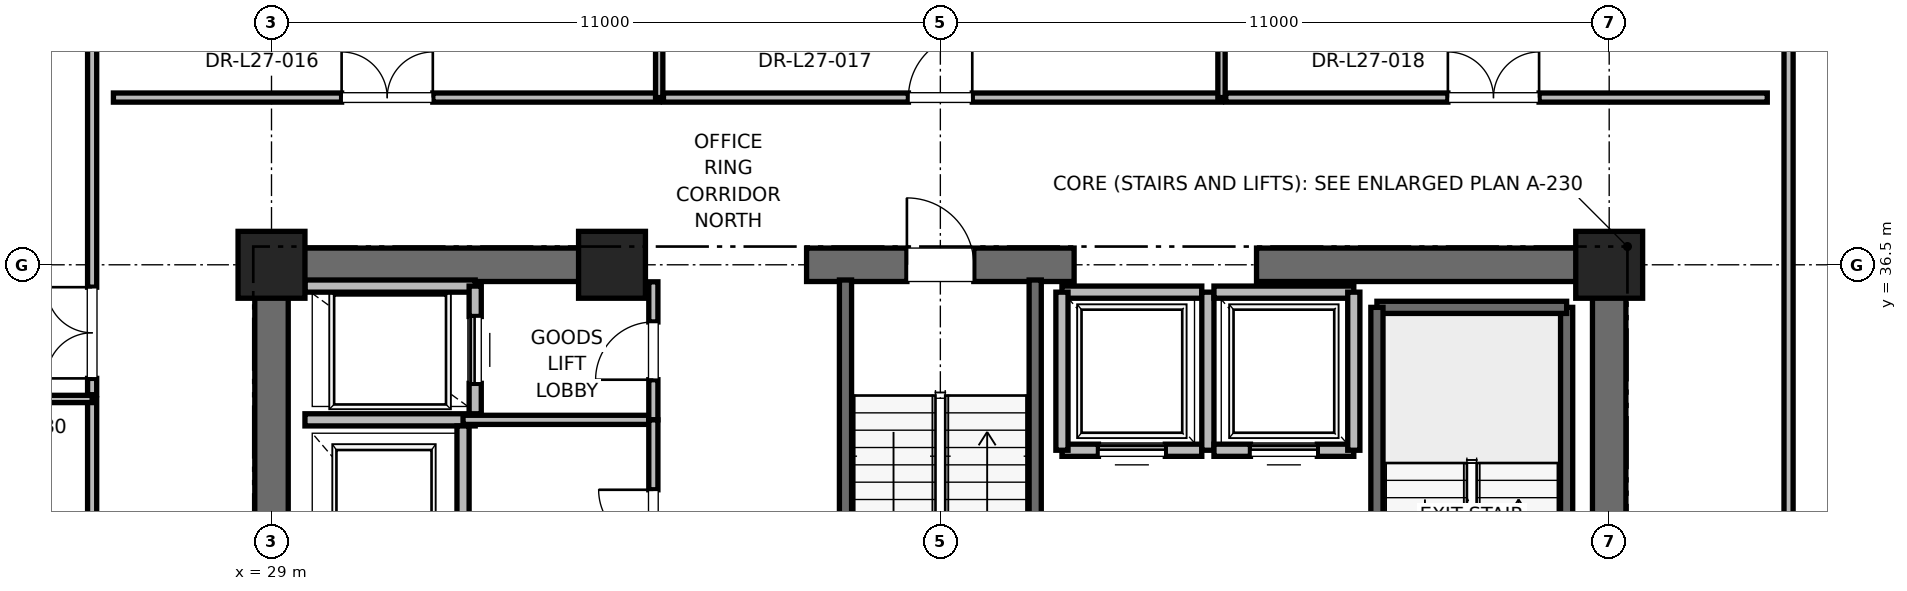
"""IFC4 building model, lengths in metres.
Left out: names, types, materials, properties, quantities, classifications, styles, units other than length and angle.
Written with IfcOpenShell. Run it as: python <this file> out.ifc"""

import sys

from ifc_helpers import new_model, si_unit, direction, frame, frame_2d, origin, origin_2d, place, context, subcontext, project, spatial, rectangle, extrude, element, fill, save


model = new_model("IFC4")
c1 = context("Model", 3, precision=1e-05, world=origin(), true_north=direction((0.0, 1.0)))
c2 = subcontext(c1, "Body", "Model", "MODEL_VIEW")
j1 = project(units=[si_unit("LENGTHUNIT", "METRE"), si_unit("PLANEANGLEUNIT", "RADIAN")], contexts=[c1])
p1 = place(None, origin())
s1 = spatial("IfcSite", under=j1, at=p1, CompositionType="ELEMENT")
p2 = place(p1, origin())
s2 = spatial("IfcBuilding", under=s1, at=p2, CompositionType="ELEMENT")
p3 = place(p2, frame((0.0, 0.0, 118.4)))
s3 = spatial("IfcBuildingStorey", under=s2, at=p3, CompositionType="ELEMENT", Elevation=118.4)
for number, where, z_axis, x_axis in (
    (1, (29.0, 36.5, 0.0), (0.0, 0.0, 1.0), (1.0, 0.0, 0.0)),
    (2, (51.0, 36.5, 0.0), (0.0, 0.0, 1.0), (1.0, 0.0, 0.0)),
    (3, (34.6, 36.5, 0.0), (0.0, 0.0, 1.0), (1.0, 0.0, 0.0)),
):
    element("IfcColumn", number, at=place(p3, frame(where, z_axis=z_axis, x_axis=x_axis)), inside=s3, PredefinedType="PILASTER", context=c2, shape_type="SweptSolid", body=[
        extrude(rectangle(XDim=1.1, YDim=1.1, at=origin_2d()), origin(), (0.0, 0.0, 1.0), 5.0),
    ])
p4 = place(p3, frame((29.0, 36.5, 0.0), z_axis=(0.0, 0.0, 1.0), x_axis=(1.0, 0.0, 0.0)))
e4 = element("IfcWall", 4, at=p4, inside=s3, PredefinedType="SHEAR", context=c2, shape_type="SweptSolid", body=[
    extrude(rectangle(XDim=5.8, YDim=0.55, at=frame_2d((2.9, 0.0))), origin(), (0.0, 0.0, 1.0), 4.7),
])
p5 = place(p3, frame((37.8, 36.5, 0.0), z_axis=(0.0, 0.0, 1.0), x_axis=(1.0, 0.0, 0.0)))
e5 = element("IfcWall", 5, at=p5, inside=s3, PredefinedType="SHEAR", context=c2, shape_type="SweptSolid", body=[
    extrude(rectangle(XDim=4.4, YDim=0.55, at=frame_2d((2.2, 0.0))), origin(), (0.0, 0.0, 1.0), 4.7),
])
p6 = place(p5, frame((1.65, 0.0, 0.0)))
e6 = element("IfcOpeningElement", 6, at=p6, cuts=e5, PredefinedType="OPENING", context=c2, shape_type="SweptSolid", body=[
    extrude(rectangle(XDim=1.1, YDim=2.15, at=frame_2d((0.55, 1.075))), frame((0.0, 0.275, 0.0), z_axis=(0.0, -1.0, 0.0), x_axis=(1.0, 0.0, 0.0)), (0.0, 0.0, 1.0), 0.55),
])
for number, where, z_axis, x_axis in (
    (7, (45.2, 36.5, 0.0), (0.0, 0.0, 1.0), (1.0, 0.0, 0.0)),
    (8, (29.0, 30.7, 0.0), (0.0, 0.0, 1.0), (0.0, 1.0, 0.0)),
):
    element("IfcWall", number, at=place(p3, frame(where, z_axis=z_axis, x_axis=x_axis)), inside=s3, PredefinedType="SHEAR", context=c2, shape_type="SweptSolid", body=[
        extrude(rectangle(XDim=5.8, YDim=0.55, at=frame_2d((2.9, 0.0))), origin(), (0.0, 0.0, 1.0), 4.7),
    ])
p7 = place(p3, frame((51.0, 27.7, 0.0), z_axis=(0.0, 0.0, 1.0), x_axis=(0.0, 1.0, 0.0)))
e9 = element("IfcWall", 9, at=p7, inside=s3, PredefinedType="SHEAR", context=c2, shape_type="SweptSolid", body=[
    extrude(rectangle(XDim=8.8, YDim=0.55, at=frame_2d((4.4, 0.0))), origin(), (0.0, 0.0, 1.0), 4.7),
])
p8 = place(p3, frame((50.3, 27.65, 0.0), z_axis=(0.0, 0.0, 1.0), x_axis=(0.0, 1.0, 0.0)))
e10 = element("IfcWall", 10, at=p8, inside=s3, PredefinedType="SOLIDWALL", context=c2, shape_type="SweptSolid", body=[
    extrude(rectangle(XDim=8.15, YDim=0.2, at=frame_2d((4.075, 0.0))), origin(), (0.0, 0.0, 1.0), 4.7),
])
p9 = place(p3, frame((47.18, 35.8, 0.0), z_axis=(0.0, 0.0, 1.0), x_axis=(1.0, 0.0, 0.0)))
e11 = element("IfcWall", 11, at=p9, inside=s3, PredefinedType="SOLIDWALL", context=c2, shape_type="SweptSolid", body=[
    extrude(rectangle(XDim=3.12, YDim=0.2, at=frame_2d((1.56, 0.0))), origin(), (0.0, 0.0, 1.0), 4.7),
])
p10 = place(p3, frame((47.18, 27.62, 0.0), z_axis=(0.0, 0.0, 1.0), x_axis=(0.0, 1.0, 0.0)))
e12 = element("IfcWall", 12, at=p10, inside=s3, PredefinedType="SOLIDWALL", context=c2, shape_type="SweptSolid", body=[
    extrude(rectangle(XDim=8.18, YDim=0.2, at=frame_2d((4.09, 0.0))), origin(), (0.0, 0.0, 1.0), 4.7),
])
p11 = place(p3, frame((38.44, 27.38, 0.0), z_axis=(0.0, 0.0, 1.0), x_axis=(0.0, 1.0, 0.0)))
e13 = element("IfcWall", 13, at=p11, inside=s3, PredefinedType="SOLIDWALL", context=c2, shape_type="SweptSolid", body=[
    extrude(rectangle(XDim=8.87, YDim=0.2, at=frame_2d((4.435, 0.0))), origin(), (0.0, 0.0, 1.0), 4.7),
])
p12 = place(p3, frame((41.56, 27.68, 0.0), z_axis=(0.0, 0.0, 1.0), x_axis=(0.0, 1.0, 0.0)))
e14 = element("IfcWall", 14, at=p12, inside=s3, PredefinedType="SOLIDWALL", context=c2, shape_type="SweptSolid", body=[
    extrude(rectangle(XDim=8.57, YDim=0.2, at=frame_2d((4.285, 0.0))), origin(), (0.0, 0.0, 1.0), 4.7),
])
p13 = place(p3, frame((29.55, 33.95, 0.0), z_axis=(0.0, 0.0, 1.0), x_axis=(1.0, 0.0, 0.0)))
e15 = element("IfcWall", 15, at=p13, inside=s3, PredefinedType="SOLIDWALL", context=c2, shape_type="SweptSolid", body=[
    extrude(rectangle(XDim=2.8, YDim=0.2, at=frame_2d((1.4, 0.0))), origin(), (0.0, 0.0, 1.0), 4.7),
])
p14 = place(p3, frame((32.15, 30.85, 0.0), z_axis=(0.0, 0.0, 1.0), x_axis=(0.0, 1.0, 0.0)))
e16 = element("IfcWall", 16, at=p14, inside=s3, PredefinedType="SOLIDWALL", context=c2, shape_type="SweptSolid", body=[
    extrude(rectangle(XDim=3.0, YDim=0.2, at=frame_2d((1.5, 0.0))), origin(), (0.0, 0.0, 1.0), 4.7),
])
p15 = place(p3, frame((32.35, 36.15, 0.0), z_axis=(0.0, 0.0, 1.0), x_axis=(-1.0, 0.0, 0.0)))
e17 = element("IfcWall", 17, at=p15, inside=s3, PredefinedType="SOLIDWALL", context=c2, shape_type="SweptSolid", body=[
    extrude(rectangle(XDim=2.8, YDim=0.2, at=frame_2d((1.4, 0.0))), origin(), (0.0, 0.0, 1.0), 3.91),
])
p16 = place(p3, frame((32.35, 34.05, 0.0), z_axis=(0.0, 0.0, 1.0), x_axis=(0.0, 1.0, 0.0)))
e18 = element("IfcWall", 18, at=p16, inside=s3, PredefinedType="SOLIDWALL", context=c2, shape_type="SweptSolid", body=[
    extrude(rectangle(XDim=2.1, YDim=0.2, at=frame_2d((1.05, 0.0))), origin(), (0.0, 0.0, 1.0), 4.7),
])
p17 = place(p16, frame((0.5, 0.0, 0.0)))
e19 = element("IfcOpeningElement", 19, at=p17, cuts=e18, PredefinedType="OPENING", context=c2, shape_type="SweptSolid", body=[
    extrude(rectangle(XDim=1.1, YDim=2.2, at=frame_2d((0.55, 1.1))), frame((0.0, 0.1, 0.0), z_axis=(0.0, -1.0, 0.0), x_axis=(1.0, 0.0, 0.0)), (0.0, 0.0, 1.0), 0.2),
])
p18 = place(p3, frame((42.0, 33.45, 0.0), z_axis=(0.0, 0.0, 1.0), x_axis=(1.0, 0.0, 0.0)))
e20 = element("IfcWall", 20, at=p18, inside=s3, PredefinedType="SOLIDWALL", context=c2, shape_type="SweptSolid", body=[
    extrude(rectangle(XDim=2.3, YDim=0.2, at=frame_2d((1.15, 0.0))), origin(), (0.0, 0.0, 1.0), 4.7),
])
p19 = place(p18, frame((0.6, 0.0, 0.0)))
e21 = element("IfcOpeningElement", 21, at=p19, cuts=e20, PredefinedType="OPENING", context=c2, shape_type="SweptSolid", body=[
    extrude(rectangle(XDim=1.1, YDim=2.2, at=frame_2d((0.55, 1.1))), frame((0.0, 0.1, 0.0), z_axis=(0.0, -1.0, 0.0), x_axis=(1.0, 0.0, 0.0)), (0.0, 0.0, 1.0), 0.2),
])
p20 = place(p3, frame((44.3, 36.05, 0.0), z_axis=(0.0, 0.0, 1.0), x_axis=(-1.0, 0.0, 0.0)))
e22 = element("IfcWall", 22, at=p20, inside=s3, PredefinedType="SOLIDWALL", context=c2, shape_type="SweptSolid", body=[
    extrude(rectangle(XDim=2.3, YDim=0.2, at=frame_2d((1.15, 0.0))), origin(), (0.0, 0.0, 1.0), 3.68),
])
for number, where, z_axis, x_axis in (
    (23, (42.0, 36.05, 0.0), (0.0, 0.0, 1.0), (0.0, -1.0, 0.0)),
    (24, (44.4, 33.45, 0.0), (0.0, 0.0, 1.0), (0.0, 1.0, 0.0)),
):
    element("IfcWall", number, at=place(p3, frame(where, z_axis=z_axis, x_axis=x_axis)), inside=s3, PredefinedType="SOLIDWALL", context=c2, shape_type="SweptSolid", body=[
        extrude(rectangle(XDim=2.6, YDim=0.2, at=frame_2d((1.3, 0.0))), origin(), (0.0, 0.0, 1.0), 3.68),
    ])
p21 = place(p3, frame((44.5, 33.45, 0.0), z_axis=(0.0, 0.0, 1.0), x_axis=(1.0, 0.0, 0.0)))
e25 = element("IfcWall", 25, at=p21, inside=s3, PredefinedType="SOLIDWALL", context=c2, shape_type="SweptSolid", body=[
    extrude(rectangle(XDim=2.3, YDim=0.2, at=frame_2d((1.15, 0.0))), origin(), (0.0, 0.0, 1.0), 4.7),
])
p22 = place(p21, frame((0.6, 0.0, 0.0)))
e26 = element("IfcOpeningElement", 26, at=p22, cuts=e25, PredefinedType="OPENING", context=c2, shape_type="SweptSolid", body=[
    extrude(rectangle(XDim=1.1, YDim=2.2, at=frame_2d((0.55, 1.1))), frame((0.0, 0.1, 0.0), z_axis=(0.0, -1.0, 0.0), x_axis=(1.0, 0.0, 0.0)), (0.0, 0.0, 1.0), 0.2),
])
p23 = place(p3, frame((46.8, 36.05, 0.0), z_axis=(0.0, 0.0, 1.0), x_axis=(-1.0, 0.0, 0.0)))
e27 = element("IfcWall", 27, at=p23, inside=s3, PredefinedType="SOLIDWALL", context=c2, shape_type="SweptSolid", body=[
    extrude(rectangle(XDim=2.3, YDim=0.2, at=frame_2d((1.15, 0.0))), origin(), (0.0, 0.0, 1.0), 3.68),
])
p24 = place(p3, frame((46.8, 33.45, 0.0), z_axis=(0.0, 0.0, 1.0), x_axis=(0.0, 1.0, 0.0)))
e28 = element("IfcWall", 28, at=p24, inside=s3, PredefinedType="SOLIDWALL", context=c2, shape_type="SweptSolid", body=[
    extrude(rectangle(XDim=2.6, YDim=0.2, at=frame_2d((1.3, 0.0))), origin(), (0.0, 0.0, 1.0), 4.7),
])
p25 = place(p3, frame((32.15, 33.95, 0.0), z_axis=(0.0, 0.0, 1.0), x_axis=(1.0, 0.0, 0.0)))
e29 = element("IfcWall", 29, at=p25, inside=s3, PredefinedType="PARTITIONING", context=c2, shape_type="SweptSolid", body=[
    extrude(rectangle(XDim=3.13, YDim=0.15, at=frame_2d((1.565, 0.0))), origin(), (0.0, 0.0, 1.0), 2.85),
])
p26 = place(p3, frame((35.28, 33.95, 0.0), z_axis=(0.0, 0.0, 1.0), x_axis=(0.0, 1.0, 0.0)))
e30 = element("IfcWall", 30, at=p26, inside=s3, PredefinedType="PARTITIONING", context=c2, shape_type="SweptSolid", body=[
    extrude(rectangle(XDim=2.27, YDim=0.15, at=frame_2d((1.135, 0.0))), origin(), (0.0, 0.0, 1.0), 2.85),
])
p27 = place(p26, frame((0.66, 0.0, 0.0)))
e31 = element("IfcOpeningElement", 31, at=p27, cuts=e30, PredefinedType="OPENING", context=c2, shape_type="SweptSolid", body=[
    extrude(rectangle(XDim=0.95, YDim=2.15, at=frame_2d((0.475, 1.075))), frame((0.0, 0.075, 0.0), z_axis=(0.0, -1.0, 0.0), x_axis=(1.0, 0.0, 0.0)), (0.0, 0.0, 1.0), 0.15),
])
p28 = place(p3, frame((35.28, 30.75, 0.0), z_axis=(0.0, 0.0, 1.0), x_axis=(0.0, 1.0, 0.0)))
e32 = element("IfcWall", 32, at=p28, inside=s3, PredefinedType="PARTITIONING", context=c2, shape_type="SweptSolid", body=[
    extrude(rectangle(XDim=3.2, YDim=0.15, at=frame_2d((1.6, 0.0))), origin(), (0.0, 0.0, 1.0), 2.85),
])
p29 = place(p28, frame((1.15, 0.0, 0.0)))
e33 = element("IfcOpeningElement", 33, at=p29, cuts=e32, PredefinedType="OPENING", context=c2, shape_type="SweptSolid", body=[
    extrude(rectangle(XDim=0.9, YDim=2.1, at=frame_2d((0.45, 1.05))), frame((0.0, 0.075, 0.0), z_axis=(0.0, -1.0, 0.0), x_axis=(1.0, 0.0, 0.0)), (0.0, 0.0, 1.0), 0.15),
])
p30 = place(p3, frame((26.4, 39.25, 0.0), z_axis=(0.0, 0.0, 1.0), x_axis=(1.0, 0.0, 0.0)))
e34 = element("IfcWall", 34, at=p30, inside=s3, PredefinedType="PARTITIONING", context=c2, shape_type="SweptSolid", body=[
    extrude(rectangle(XDim=8.976, YDim=0.15, at=frame_2d((4.488, 0.0))), origin(), (0.0, 0.0, 1.0), 2.85),
])
p31 = place(p30, frame((3.753, 0.0, 0.0)))
e35 = element("IfcOpeningElement", 35, at=p31, cuts=e34, PredefinedType="OPENING", context=c2, shape_type="SweptSolid", body=[
    extrude(rectangle(XDim=1.5, YDim=2.25, at=frame_2d((0.75, 1.125))), frame((0.0, 0.075, 0.0), z_axis=(0.0, -1.0, 0.0), x_axis=(1.0, 0.0, 0.0)), (0.0, 0.0, 1.0), 0.15),
])
p32 = place(p3, frame((35.376, 39.25, 0.0), z_axis=(0.0, 0.0, 1.0), x_axis=(0.0, 1.0, 0.0)))
e36 = element("IfcWall", 36, at=p32, inside=s3, PredefinedType="PARTITIONING", context=c2, shape_type="SweptSolid", body=[
    extrude(rectangle(XDim=10.821, YDim=0.12, at=frame_2d((5.41, 0.0))), origin(), (0.0, 0.0, 1.0), 2.85),
])
p33 = place(p3, frame((35.446, 39.25, 0.0), z_axis=(0.0, 0.0, 1.0), x_axis=(1.0, 0.0, 0.0)))
e37 = element("IfcWall", 37, at=p33, inside=s3, PredefinedType="PARTITIONING", context=c2, shape_type="SweptSolid", body=[
    extrude(rectangle(XDim=9.178, YDim=0.15, at=frame_2d((4.589, 0.0))), origin(), (0.0, 0.0, 1.0), 2.85),
])
p34 = place(p33, frame((4.029, 0.0, 0.0)))
e38 = element("IfcOpeningElement", 38, at=p34, cuts=e37, PredefinedType="OPENING", context=c2, shape_type="SweptSolid", body=[
    extrude(rectangle(XDim=1.05, YDim=2.2, at=frame_2d((0.525, 1.1))), frame((0.0, 0.075, 0.0), z_axis=(0.0, -1.0, 0.0), x_axis=(1.0, 0.0, 0.0)), (0.0, 0.0, 1.0), 0.15),
])
p35 = place(p3, frame((44.624, 39.25, 0.0), z_axis=(0.0, 0.0, 1.0), x_axis=(0.0, 1.0, 0.0)))
e39 = element("IfcWall", 39, at=p35, inside=s3, PredefinedType="PARTITIONING", context=c2, shape_type="SweptSolid", body=[
    extrude(rectangle(XDim=10.821, YDim=0.12, at=frame_2d((5.41, 0.0))), origin(), (0.0, 0.0, 1.0), 2.85),
])
p36 = place(p3, frame((44.694, 39.25, 0.0), z_axis=(0.0, 0.0, 1.0), x_axis=(1.0, 0.0, 0.0)))
e40 = element("IfcWall", 40, at=p36, inside=s3, PredefinedType="PARTITIONING", context=c2, shape_type="SweptSolid", body=[
    extrude(rectangle(XDim=8.906, YDim=0.15, at=frame_2d((4.453, 0.0))), origin(), (0.0, 0.0, 1.0), 2.85),
])
p37 = place(p36, frame((3.653, 0.0, 0.0)))
e41 = element("IfcOpeningElement", 41, at=p37, cuts=e40, PredefinedType="OPENING", context=c2, shape_type="SweptSolid", body=[
    extrude(rectangle(XDim=1.5, YDim=2.25, at=frame_2d((0.75, 1.125))), frame((0.0, 0.075, 0.0), z_axis=(0.0, -1.0, 0.0), x_axis=(1.0, 0.0, 0.0)), (0.0, 0.0, 1.0), 0.15),
])
p38 = place(p3, frame((26.05, 21.531, 0.0), z_axis=(0.0, 0.0, 1.0), x_axis=(0.0, 1.0, 0.0)))
e42 = element("IfcWall", 42, at=p38, inside=s3, PredefinedType="PARTITIONING", context=c2, shape_type="SweptSolid", body=[
    extrude(rectangle(XDim=12.762, YDim=0.15, at=frame_2d((6.381, 0.0))), origin(), (0.0, 0.0, 1.0), 2.85),
])
p39 = place(p38, frame((5.821, 0.0, 0.0)))
e43 = element("IfcOpeningElement", 43, at=p39, cuts=e42, PredefinedType="OPENING", context=c2, shape_type="SweptSolid", body=[
    extrude(rectangle(XDim=1.05, YDim=2.2, at=frame_2d((0.525, 1.1))), frame((0.0, 0.075, 0.0), z_axis=(0.0, -1.0, 0.0), x_axis=(1.0, 0.0, 0.0)), (0.0, 0.0, 1.0), 0.15),
])
p40 = place(p3, frame((13.77, 34.293, 0.0), z_axis=(0.0, 0.0, 1.0), x_axis=(1.0, 0.0, 0.0)))
e44 = element("IfcWall", 44, at=p40, inside=s3, PredefinedType="PARTITIONING", context=c2, shape_type="SweptSolid", body=[
    extrude(rectangle(XDim=12.28, YDim=0.12, at=frame_2d((6.14, 0.0))), origin(), (0.0, 0.0, 1.0), 2.85),
])
p41 = place(p3, frame((26.05, 34.364, 0.0), z_axis=(0.0, 0.0, 1.0), x_axis=(0.0, 1.0, 0.0)))
e45 = element("IfcWall", 45, at=p41, inside=s3, PredefinedType="PARTITIONING", context=c2, shape_type="SweptSolid", body=[
    extrude(rectangle(XDim=12.007, YDim=0.15, at=frame_2d((6.004, 0.0))), origin(), (0.0, 0.0, 1.0), 2.85),
])
p42 = place(p41, frame((0.268, 0.0, 0.0)))
e46 = element("IfcOpeningElement", 46, at=p42, cuts=e45, PredefinedType="OPENING", context=c2, shape_type="SweptSolid", body=[
    extrude(rectangle(XDim=1.5, YDim=2.25, at=frame_2d((0.75, 1.125))), frame((0.0, 0.075, 0.0), z_axis=(0.0, -1.0, 0.0), x_axis=(1.0, 0.0, 0.0)), (0.0, 0.0, 1.0), 0.15),
])
p43 = place(p3, frame((53.95, 24.551, 0.0), z_axis=(0.0, 0.0, 1.0), x_axis=(0.0, 1.0, 0.0)))
e47 = element("IfcWall", 47, at=p43, inside=s3, PredefinedType="PARTITIONING", context=c2, shape_type="SweptSolid", body=[
    extrude(rectangle(XDim=21.82, YDim=0.15, at=frame_2d((10.91, 0.0))), origin(), (0.0, 0.0, 1.0), 2.85),
])
p44 = place(p43, frame((5.425, 0.0, 0.0)))
e48 = element("IfcOpeningElement", 48, at=p44, cuts=e47, PredefinedType="OPENING", context=c2, shape_type="SweptSolid", body=[
    extrude(rectangle(XDim=1.0, YDim=2.15, at=frame_2d((0.5, 1.075))), frame((0.0, 0.075, 0.0), z_axis=(0.0, -1.0, 0.0), x_axis=(1.0, 0.0, 0.0)), (0.0, 0.0, 1.0), 0.15),
])
p45 = place(p6, origin())
e49 = element("IfcDoor", 49, at=p45, inside=s3, OperationType="SINGLE_SWING_LEFT", PredefinedType="DOOR", context=c2, shape_type="SweptSolid", body=[
    extrude(rectangle(XDim=1.1, YDim=2.15, at=frame_2d((0.55, 1.075))), frame((0.0, 0.025, 0.0), z_axis=(0.0, -1.0, 0.0), x_axis=(1.0, 0.0, 0.0)), (0.0, 0.0, 1.0), 0.05),
])
fill(e6, e49)
p46 = place(p17, origin())
e50 = element("IfcDoor", 50, at=p46, inside=s3, OperationType="SLIDING_TO_RIGHT", PredefinedType="DOOR", context=c2, shape_type="SweptSolid", body=[
    extrude(rectangle(XDim=1.1, YDim=2.2, at=frame_2d((0.55, 1.1))), frame((0.0, 0.025, 0.0), z_axis=(0.0, -1.0, 0.0), x_axis=(1.0, 0.0, 0.0)), (0.0, 0.0, 1.0), 0.05),
])
fill(e19, e50)
p47 = place(p19, origin())
e51 = element("IfcDoor", 51, at=p47, inside=s3, OperationType="SLIDING_TO_RIGHT", PredefinedType="DOOR", context=c2, shape_type="SweptSolid", body=[
    extrude(rectangle(XDim=1.1, YDim=2.2, at=frame_2d((0.55, 1.1))), frame((0.0, 0.025, 0.0), z_axis=(0.0, -1.0, 0.0), x_axis=(1.0, 0.0, 0.0)), (0.0, 0.0, 1.0), 0.05),
])
fill(e21, e51)
p48 = place(p22, origin())
e52 = element("IfcDoor", 52, at=p48, inside=s3, OperationType="SLIDING_TO_RIGHT", PredefinedType="DOOR", context=c2, shape_type="SweptSolid", body=[
    extrude(rectangle(XDim=1.1, YDim=2.2, at=frame_2d((0.55, 1.1))), frame((0.0, 0.025, 0.0), z_axis=(0.0, -1.0, 0.0), x_axis=(1.0, 0.0, 0.0)), (0.0, 0.0, 1.0), 0.05),
])
fill(e26, e52)
p49 = place(p27, origin())
e53 = element("IfcDoor", 53, at=p49, inside=s3, OperationType="SINGLE_SWING_LEFT", PredefinedType="DOOR", context=c2, shape_type="SweptSolid", body=[
    extrude(rectangle(XDim=0.95, YDim=2.15, at=frame_2d((0.475, 1.075))), frame((0.0, 0.025, 0.0), z_axis=(0.0, -1.0, 0.0), x_axis=(1.0, 0.0, 0.0)), (0.0, 0.0, 1.0), 0.05),
])
fill(e31, e53)
p50 = place(p29, origin())
e54 = element("IfcDoor", 54, at=p50, inside=s3, OperationType="SINGLE_SWING_RIGHT", PredefinedType="DOOR", context=c2, shape_type="SweptSolid", body=[
    extrude(rectangle(XDim=0.9, YDim=2.1, at=frame_2d((0.45, 1.05))), frame((0.0, 0.025, 0.0), z_axis=(0.0, -1.0, 0.0), x_axis=(1.0, 0.0, 0.0)), (0.0, 0.0, 1.0), 0.05),
])
fill(e33, e54)
p51 = place(p31, origin())
e55 = element("IfcDoor", 55, at=p51, inside=s3, OperationType="DOUBLE_DOOR_SINGLE_SWING", PredefinedType="DOOR", context=c2, shape_type="SweptSolid", body=[
    extrude(rectangle(XDim=1.5, YDim=2.25, at=frame_2d((0.75, 1.125))), frame((0.0, 0.025, 0.0), z_axis=(0.0, -1.0, 0.0), x_axis=(1.0, 0.0, 0.0)), (0.0, 0.0, 1.0), 0.05),
])
fill(e35, e55)
p52 = place(p34, origin())
e56 = element("IfcDoor", 56, at=p52, inside=s3, OperationType="SINGLE_SWING_RIGHT", PredefinedType="DOOR", context=c2, shape_type="SweptSolid", body=[
    extrude(rectangle(XDim=1.05, YDim=2.2, at=frame_2d((0.525, 1.1))), frame((0.0, 0.025, 0.0), z_axis=(0.0, -1.0, 0.0), x_axis=(1.0, 0.0, 0.0)), (0.0, 0.0, 1.0), 0.05),
])
fill(e38, e56)
p53 = place(p37, origin())
e57 = element("IfcDoor", 57, at=p53, inside=s3, OperationType="DOUBLE_DOOR_SINGLE_SWING", PredefinedType="DOOR", context=c2, shape_type="SweptSolid", body=[
    extrude(rectangle(XDim=1.5, YDim=2.25, at=frame_2d((0.75, 1.125))), frame((0.0, 0.025, 0.0), z_axis=(0.0, -1.0, 0.0), x_axis=(1.0, 0.0, 0.0)), (0.0, 0.0, 1.0), 0.05),
])
fill(e41, e57)
p54 = place(p42, origin())
e58 = element("IfcDoor", 58, at=p54, inside=s3, OperationType="DOUBLE_DOOR_SINGLE_SWING", PredefinedType="DOOR", context=c2, shape_type="SweptSolid", body=[
    extrude(rectangle(XDim=1.5, YDim=2.25, at=frame_2d((0.75, 1.125))), frame((0.0, 0.025, 0.0), z_axis=(0.0, -1.0, 0.0), x_axis=(1.0, 0.0, 0.0)), (0.0, 0.0, 1.0), 0.05),
])
fill(e46, e58)
save(model, sys.argv[1])
